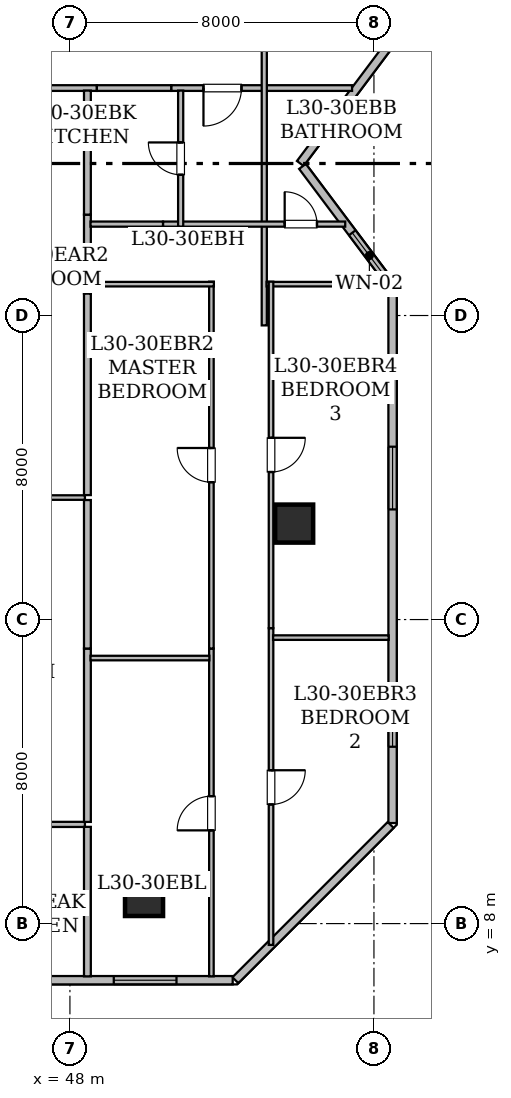
"""IFC4 building model, lengths in metres.
Left out: names, types, materials, properties, quantities, classifications, styles, units other than length and angle.
Written with IfcOpenShell. Run it as: python <this file> out.ifc"""

import sys

from ifc_helpers import new_model, si_unit, direction, frame, frame_2d, origin, origin_2d, place, context, subcontext, project, spatial, rectangle, hollow_rectangle, extrude, element, fill, save


model = new_model("IFC4")
c1 = context("Model", 3, precision=1e-05, world=origin(), true_north=direction((0.0, 1.0)))
c2 = subcontext(c1, "Body", "Model", "MODEL_VIEW")
j1 = project(units=[si_unit("LENGTHUNIT", "METRE"), si_unit("PLANEANGLEUNIT", "RADIAN")], contexts=[c1])
p1 = place(None, origin())
s1 = spatial("IfcSite", under=j1, at=p1, CompositionType="ELEMENT")
p2 = place(p1, origin())
s2 = spatial("IfcBuilding", under=s1, at=p2, CompositionType="ELEMENT")
p3 = place(p2, frame((0.0, 0.0, 120.15)))
s3 = spatial("IfcBuildingStorey", under=s2, at=p3, CompositionType="ELEMENT", Elevation=120.15)
for number, where, z_axis, x_axis in (
    (1, (49.95, 8.7, 0.0), (0.0, 0.0, 1.0), (1.0, 0.0, 0.0)),
    (2, (53.9, 18.525, 0.0), (0.0, 0.0, 1.0), (1.0, 0.0, 0.0)),
):
    element("IfcColumn", number, at=place(p3, frame(where, z_axis=z_axis, x_axis=x_axis)), inside=s3, PredefinedType="COLUMN", context=c2, shape_type="SweptSolid", body=[
        extrude(hollow_rectangle(XDim=1.0, YDim=1.0, WallThickness=0.05, at=origin_2d()), origin(), (0.0, 0.0, 1.0), 3.65),
    ])
p4 = place(p3, frame((56.456, 31.191, 0.0), z_axis=(0.0, 0.0, 1.0), x_axis=(-0.600137081448, -0.799897170561, 0.0)))
e3 = element("IfcWall", 3, at=p4, inside=s3, PredefinedType="STANDARD", context=c2, shape_type="SweptSolid", body=[
    extrude(rectangle(XDim=3.989, YDim=0.22, at=frame_2d((1.995, 0.0))), origin(), (0.0, 0.0, 1.0), 3.43),
])
p5 = place(p3, frame((54.119, 27.924, 0.0), z_axis=(0.0, 0.0, 1.0), x_axis=(0.600039540588, -0.799970343032, 0.0)))
e4 = element("IfcWall", 4, at=p5, inside=s3, PredefinedType="STANDARD", context=c2, shape_type="SweptSolid", body=[
    extrude(rectangle(XDim=3.952, YDim=0.22, at=frame_2d((1.976, 0.0))), origin(), (0.0, 0.0, 1.0), 3.43),
])
p6 = place(p5, frame((2.184, 0.0, 0.85)))
e5 = element("IfcOpeningElement", 5, at=p6, cuts=e4, PredefinedType="OPENING", context=c2, shape_type="SweptSolid", body=[
    extrude(rectangle(XDim=1.5, YDim=1.6, at=frame_2d((0.75, 0.8))), frame((0.0, 0.12, 0.0), z_axis=(0.0, -1.0, 0.0), x_axis=(1.0, 0.0, 0.0)), (0.0, 0.0, 1.0), 0.24),
])
p7 = place(p3, frame((56.49, 24.707, 0.0), z_axis=(0.0, 0.0, 1.0), x_axis=(0.0, -1.0, 0.0)))
e6 = element("IfcWall", 6, at=p7, inside=s3, PredefinedType="STANDARD", context=c2, shape_type="SweptSolid", body=[
    extrude(rectangle(XDim=14.061, YDim=0.22, at=frame_2d((7.031, 0.0))), origin(), (0.0, 0.0, 1.0), 3.43),
])
p8 = place(p7, frame((10.404, 0.0, 0.85)))
e7 = element("IfcOpeningElement", 7, at=p8, cuts=e6, PredefinedType="OPENING", context=c2, shape_type="SweptSolid", body=[
    extrude(rectangle(XDim=1.65, YDim=1.55, at=frame_2d((0.825, 0.775))), frame((0.0, 0.12, 0.0), z_axis=(0.0, -1.0, 0.0), x_axis=(1.0, 0.0, 0.0)), (0.0, 0.0, 1.0), 0.24),
])
p9 = place(p7, frame((4.159, 0.0, 0.85)))
e8 = element("IfcOpeningElement", 8, at=p9, cuts=e6, PredefinedType="OPENING", context=c2, shape_type="SweptSolid", body=[
    extrude(rectangle(XDim=1.65, YDim=1.55, at=frame_2d((0.825, 0.775))), frame((0.0, 0.12, 0.0), z_axis=(0.0, -1.0, 0.0), x_axis=(1.0, 0.0, 0.0)), (0.0, 0.0, 1.0), 0.24),
])
p10 = place(p3, frame((56.44, 10.596, 0.0), z_axis=(0.0, 0.0, 1.0), x_axis=(-0.707106781187, -0.707106781187, 0.0)))
e9 = element("IfcWall", 9, at=p10, inside=s3, PredefinedType="STANDARD", context=c2, shape_type="SweptSolid", body=[
    extrude(rectangle(XDim=5.778, YDim=0.22, at=frame_2d((2.889, 0.0))), origin(), (0.0, 0.0, 1.0), 3.43),
])
p11 = place(p3, frame((52.283, 6.51, 0.0), z_axis=(0.0, 0.0, 1.0), x_axis=(-1.0, 0.0, 0.0)))
e10 = element("IfcWall", 10, at=p11, inside=s3, PredefinedType="STANDARD", context=c2, shape_type="SweptSolid", body=[
    extrude(rectangle(XDim=38.568, YDim=0.22, at=frame_2d((19.284, 0.0))), origin(), (0.0, 0.0, 1.0), 3.43),
])
p12 = place(p11, frame((35.53, 0.0, 0.85)))
e11 = element("IfcOpeningElement", 11, at=p12, cuts=e10, PredefinedType="OPENING", context=c2, shape_type="SweptSolid", body=[
    extrude(rectangle(XDim=1.65, YDim=1.55, at=frame_2d((0.825, 0.775))), frame((0.0, 0.12, 0.0), z_axis=(0.0, -1.0, 0.0), x_axis=(1.0, 0.0, 0.0)), (0.0, 0.0, 1.0), 0.24),
])
p13 = place(p11, frame((28.578, 0.0, 0.85)))
e12 = element("IfcOpeningElement", 12, at=p13, cuts=e10, PredefinedType="OPENING", context=c2, shape_type="SweptSolid", body=[
    extrude(rectangle(XDim=1.65, YDim=1.55, at=frame_2d((0.825, 0.775))), frame((0.0, 0.12, 0.0), z_axis=(0.0, -1.0, 0.0), x_axis=(1.0, 0.0, 0.0)), (0.0, 0.0, 1.0), 0.24),
])
p14 = place(p11, frame((21.362, 0.0, 0.85)))
e13 = element("IfcOpeningElement", 13, at=p14, cuts=e10, PredefinedType="OPENING", context=c2, shape_type="SweptSolid", body=[
    extrude(rectangle(XDim=1.65, YDim=1.55, at=frame_2d((0.825, 0.775))), frame((0.0, 0.12, 0.0), z_axis=(0.0, -1.0, 0.0), x_axis=(1.0, 0.0, 0.0)), (0.0, 0.0, 1.0), 0.24),
])
p15 = place(p11, frame((14.097, 0.0, 0.85)))
e14 = element("IfcOpeningElement", 14, at=p15, cuts=e10, PredefinedType="OPENING", context=c2, shape_type="SweptSolid", body=[
    extrude(rectangle(XDim=1.65, YDim=1.55, at=frame_2d((0.825, 0.775))), frame((0.0, 0.12, 0.0), z_axis=(0.0, -1.0, 0.0), x_axis=(1.0, 0.0, 0.0)), (0.0, 0.0, 1.0), 0.24),
])
p16 = place(p11, frame((1.479, 0.0, 0.85)))
e15 = element("IfcOpeningElement", 15, at=p16, cuts=e10, PredefinedType="OPENING", context=c2, shape_type="SweptSolid", body=[
    extrude(rectangle(XDim=1.65, YDim=1.55, at=frame_2d((0.825, 0.775))), frame((0.0, 0.12, 0.0), z_axis=(0.0, -1.0, 0.0), x_axis=(1.0, 0.0, 0.0)), (0.0, 0.0, 1.0), 0.24),
])
p17 = place(p3, frame((48.709, 29.985, 0.0), z_axis=(0.0, 0.0, 1.0), x_axis=(-1.0, 0.0, 0.0)))
e16 = element("IfcWall", 16, at=p17, inside=s3, PredefinedType="STANDARD", context=c2, shape_type="SweptSolid", body=[
    extrude(rectangle(XDim=3.906, YDim=0.15, at=frame_2d((1.953, 0.0))), origin(), (0.0, 0.0, 1.0), 2.647),
])
p18 = place(p3, frame((55.424, 29.985, 0.0), z_axis=(0.0, 0.0, 1.0), x_axis=(-1.0, 0.0, 0.0)))
e17 = element("IfcWall", 17, at=p18, inside=s3, PredefinedType="STANDARD", context=c2, shape_type="SweptSolid", body=[
    extrude(rectangle(XDim=4.759, YDim=0.15, at=frame_2d((2.379, 0.0))), origin(), (0.0, 0.0, 1.0), 2.876),
])
p19 = place(p18, frame((2.91, 0.0, 0.0)))
e18 = element("IfcOpeningElement", 18, at=p19, cuts=e17, PredefinedType="OPENING", context=c2, shape_type="SweptSolid", body=[
    extrude(rectangle(XDim=1.0, YDim=2.15, at=frame_2d((0.5, 1.075))), frame((0.0, 0.085, 0.0), z_axis=(0.0, -1.0, 0.0), x_axis=(1.0, 0.0, 0.0)), (0.0, 0.0, 1.0), 0.17),
])
p20 = place(p3, frame((50.665, 29.985, 0.0), z_axis=(0.0, 0.0, 1.0), x_axis=(-1.0, 0.0, 0.0)))
e19 = element("IfcWall", 19, at=p20, inside=s3, PredefinedType="STANDARD", context=c2, shape_type="SweptSolid", body=[
    extrude(rectangle(XDim=1.956, YDim=0.15, at=frame_2d((0.978, 0.0))), origin(), (0.0, 0.0, 1.0), 3.43),
])
p21 = place(p3, frame((44.803, 19.21, 0.0), z_axis=(0.0, 0.0, 1.0), x_axis=(1.0, 0.0, 0.0)))
e20 = element("IfcWall", 20, at=p21, inside=s3, PredefinedType="PARTITIONING", context=c2, shape_type="SweptSolid", body=[
    extrude(rectangle(XDim=3.592, YDim=0.12, at=frame_2d((1.796, 0.0))), origin(), (0.0, 0.0, 1.0), 2.647),
])
p22 = place(p21, frame((0.397, 0.0, 0.0)))
e21 = element("IfcOpeningElement", 21, at=p22, cuts=e20, PredefinedType="OPENING", context=c2, shape_type="SweptSolid", body=[
    extrude(rectangle(XDim=0.9, YDim=2.1, at=frame_2d((0.45, 1.05))), frame((0.0, 0.07, 0.0), z_axis=(0.0, -1.0, 0.0), x_axis=(1.0, 0.0, 0.0)), (0.0, 0.0, 1.0), 0.14),
])
p23 = place(p3, frame((48.395, 10.61, 0.0), z_axis=(0.0, 0.0, 1.0), x_axis=(-1.0, 0.0, 0.0)))
e22 = element("IfcWall", 22, at=p23, inside=s3, PredefinedType="PARTITIONING", context=c2, shape_type="SweptSolid", body=[
    extrude(rectangle(XDim=4.166, YDim=0.135, at=frame_2d((2.083, 0.0))), origin(), (0.0, 0.0, 1.0), 3.43),
])
p24 = place(p23, frame((1.658, 0.0, 0.0)))
e23 = element("IfcOpeningElement", 23, at=p24, cuts=e22, PredefinedType="OPENING", context=c2, shape_type="SweptSolid", body=[
    extrude(rectangle(XDim=0.85, YDim=2.1, at=frame_2d((0.425, 1.05))), frame((0.0, 0.077, 0.0), z_axis=(0.0, -1.0, 0.0), x_axis=(1.0, 0.0, 0.0)), (0.0, 0.0, 1.0), 0.155),
])
p25 = place(p3, frame((48.46, 15.237, 0.0), z_axis=(0.0, 0.0, 1.0), x_axis=(0.0, -1.0, 0.0)))
e24 = element("IfcWall", 24, at=p25, inside=s3, PredefinedType="STANDARD", context=c2, shape_type="SweptSolid", body=[
    extrude(rectangle(XDim=4.562, YDim=0.18, at=frame_2d((2.281, 0.0))), origin(), (0.0, 0.0, 1.0), 2.647),
])
p26 = place(p3, frame((48.46, 19.145, 0.0), z_axis=(0.0, 0.0, 1.0), x_axis=(0.0, -1.0, 0.0)))
e25 = element("IfcWall", 25, at=p26, inside=s3, PredefinedType="STANDARD", context=c2, shape_type="SweptSolid", body=[
    extrude(rectangle(XDim=3.908, YDim=0.18, at=frame_2d((1.954, 0.0))), origin(), (0.0, 0.0, 1.0), 2.687),
])
p27 = place(p3, frame((48.46, 26.654, 0.0), z_axis=(0.0, 0.0, 1.0), x_axis=(0.0, -1.0, 0.0)))
e26 = element("IfcWall", 26, at=p27, inside=s3, PredefinedType="STANDARD", context=c2, shape_type="SweptSolid", body=[
    extrude(rectangle(XDim=2.078, YDim=0.18, at=frame_2d((1.039, 0.0))), origin(), (0.0, 0.0, 1.0), 3.43),
])
p28 = place(p3, frame((48.46, 29.918, 0.0), z_axis=(0.0, 0.0, 1.0), x_axis=(0.0, -1.0, 0.0)))
e27 = element("IfcWall", 27, at=p28, inside=s3, PredefinedType="STANDARD", context=c2, shape_type="SweptSolid", body=[
    extrude(rectangle(XDim=3.264, YDim=0.18, at=frame_2d((1.632, 0.0))), origin(), (0.0, 0.0, 1.0), 3.43),
])
p29 = place(p3, frame((48.46, 24.576, 0.0), z_axis=(0.0, 0.0, 1.0), x_axis=(0.0, -1.0, 0.0)))
e28 = element("IfcWall", 28, at=p29, inside=s3, PredefinedType="STANDARD", context=c2, shape_type="SweptSolid", body=[
    extrude(rectangle(XDim=5.301, YDim=0.18, at=frame_2d((2.65, 0.0))), origin(), (0.0, 0.0, 1.0), 2.687),
])
p30 = place(p3, frame((48.46, 10.545, 0.0), z_axis=(0.0, 0.0, 1.0), x_axis=(0.0, -1.0, 0.0)))
e29 = element("IfcWall", 29, at=p30, inside=s3, PredefinedType="STANDARD", context=c2, shape_type="SweptSolid", body=[
    extrude(rectangle(XDim=3.933, YDim=0.18, at=frame_2d((1.966, 0.0))), origin(), (0.0, 0.0, 1.0), 2.876),
])
p31 = place(p3, frame((53.114, 32.52, 0.0), z_axis=(0.0, 0.0, 1.0), x_axis=(0.0, -1.0, 0.0)))
e30 = element("IfcWall", 30, at=p31, inside=s3, PredefinedType="PARTITIONING", context=c2, shape_type="SweptSolid", body=[
    extrude(rectangle(XDim=8.78, YDim=0.135, at=frame_2d((4.39, 0.0))), origin(), (0.0, 0.0, 1.0), 3.43),
])
p32 = place(p3, frame((50.449, 26.405, 0.0), z_axis=(0.0, 0.0, 1.0), x_axis=(1.0, 0.0, 0.0)))
e31 = element("IfcWall", 31, at=p32, inside=s3, PredefinedType="PARTITIONING", context=c2, shape_type="SweptSolid", body=[
    extrude(rectangle(XDim=4.795, YDim=0.135, at=frame_2d((2.397, 0.0))), origin(), (0.0, 0.0, 1.0), 2.876),
])
p33 = place(p32, frame((3.202, 0.0, 0.0)))
e32 = element("IfcOpeningElement", 32, at=p33, cuts=e31, PredefinedType="OPENING", context=c2, shape_type="SweptSolid", body=[
    extrude(rectangle(XDim=0.85, YDim=2.1, at=frame_2d((0.425, 1.05))), frame((0.0, 0.077, 0.0), z_axis=(0.0, -1.0, 0.0), x_axis=(1.0, 0.0, 0.0)), (0.0, 0.0, 1.0), 0.155),
])
p34 = place(p3, frame((48.542, 26.405, 0.0), z_axis=(0.0, 0.0, 1.0), x_axis=(1.0, 0.0, 0.0)))
e33 = element("IfcWall", 33, at=p34, inside=s3, PredefinedType="PARTITIONING", context=c2, shape_type="SweptSolid", body=[
    extrude(rectangle(XDim=1.907, YDim=0.135, at=frame_2d((0.954, 0.0))), origin(), (0.0, 0.0, 1.0), 3.43),
])
p35 = place(p3, frame((50.914, 26.34, 0.0), z_axis=(0.0, 0.0, 1.0), x_axis=(0.0, 1.0, 0.0)))
e34 = element("IfcWall", 34, at=p35, inside=s3, PredefinedType="PARTITIONING", context=c2, shape_type="SweptSolid", body=[
    extrude(rectangle(XDim=3.578, YDim=0.135, at=frame_2d((1.789, 0.0))), origin(), (0.0, 0.0, 1.0), 3.43),
])
p36 = place(p35, frame((1.364, 0.0, 0.0)))
e35 = element("IfcOpeningElement", 35, at=p36, cuts=e34, PredefinedType="OPENING", context=c2, shape_type="SweptSolid", body=[
    extrude(rectangle(XDim=0.85, YDim=2.1, at=frame_2d((0.425, 1.05))), frame((0.0, 0.077, 0.0), z_axis=(0.0, -1.0, 0.0), x_axis=(1.0, 0.0, 0.0)), (0.0, 0.0, 1.0), 0.155),
])
p37 = place(p3, frame((51.723, 6.612, 0.0), z_axis=(0.0, 0.0, 1.0), x_axis=(0.0, 1.0, 0.0)))
e36 = element("IfcWall", 36, at=p37, inside=s3, PredefinedType="PARTITIONING", context=c2, shape_type="SweptSolid", body=[
    extrude(rectangle(XDim=8.625, YDim=0.12, at=frame_2d((4.312, 0.0))), origin(), (0.0, 0.0, 1.0), 2.876),
])
p38 = place(p37, frame((3.841, 0.0, 0.0)))
e37 = element("IfcOpeningElement", 37, at=p38, cuts=e36, PredefinedType="OPENING", context=c2, shape_type="SweptSolid", body=[
    extrude(rectangle(XDim=0.9, YDim=2.1, at=frame_2d((0.45, 1.05))), frame((0.0, 0.07, 0.0), z_axis=(0.0, -1.0, 0.0), x_axis=(1.0, 0.0, 0.0)), (0.0, 0.0, 1.0), 0.14),
])
p39 = place(p3, frame((51.723, 15.237, 0.0), z_axis=(0.0, 0.0, 1.0), x_axis=(0.0, 1.0, 0.0)))
e38 = element("IfcWall", 38, at=p39, inside=s3, PredefinedType="PARTITIONING", context=c2, shape_type="SweptSolid", body=[
    extrude(rectangle(XDim=9.653, YDim=0.12, at=frame_2d((4.826, 0.0))), origin(), (0.0, 0.0, 1.0), 2.687),
])
p40 = place(p39, frame((4.377, 0.0, 0.0)))
e39 = element("IfcOpeningElement", 39, at=p40, cuts=e38, PredefinedType="OPENING", context=c2, shape_type="SweptSolid", body=[
    extrude(rectangle(XDim=0.9, YDim=2.1, at=frame_2d((0.45, 1.05))), frame((0.0, 0.07, 0.0), z_axis=(0.0, -1.0, 0.0), x_axis=(1.0, 0.0, 0.0)), (0.0, 0.0, 1.0), 0.14),
])
p41 = place(p3, frame((51.788, 24.825, 0.0), z_axis=(0.0, 0.0, 1.0), x_axis=(-1.0, 0.0, 0.0)))
e40 = element("IfcWall", 40, at=p41, inside=s3, PredefinedType="PARTITIONING", context=c2, shape_type="SweptSolid", body=[
    extrude(rectangle(XDim=3.246, YDim=0.12, at=frame_2d((1.623, 0.0))), origin(), (0.0, 0.0, 1.0), 3.43),
])
p42 = place(p3, frame((53.292, 15.774, 0.0), z_axis=(0.0, 0.0, 1.0), x_axis=(0.0, -1.0, 0.0)))
e41 = element("IfcWall", 41, at=p42, inside=s3, PredefinedType="PARTITIONING", context=c2, shape_type="SweptSolid", body=[
    extrude(rectangle(XDim=8.335, YDim=0.12, at=frame_2d((4.167, 0.0))), origin(), (0.0, 0.0, 1.0), 3.43),
])
p43 = place(p42, frame((3.739, 0.0, 0.0)))
e42 = element("IfcOpeningElement", 42, at=p43, cuts=e41, PredefinedType="OPENING", context=c2, shape_type="SweptSolid", body=[
    extrude(rectangle(XDim=0.9, YDim=2.1, at=frame_2d((0.45, 1.05))), frame((0.0, 0.07, 0.0), z_axis=(0.0, -1.0, 0.0), x_axis=(1.0, 0.0, 0.0)), (0.0, 0.0, 1.0), 0.14),
])
p44 = place(p3, frame((56.332, 24.825, 0.0), z_axis=(0.0, 0.0, 1.0), x_axis=(-1.0, 0.0, 0.0)))
e43 = element("IfcWall", 43, at=p44, inside=s3, PredefinedType="PARTITIONING", context=c2, shape_type="SweptSolid", body=[
    extrude(rectangle(XDim=3.157, YDim=0.12, at=frame_2d((1.579, 0.0))), origin(), (0.0, 0.0, 1.0), 2.876),
])
p45 = place(p3, frame((53.292, 24.89, 0.0), z_axis=(0.0, 0.0, 1.0), x_axis=(0.0, -1.0, 0.0)))
e44 = element("IfcWall", 44, at=p45, inside=s3, PredefinedType="PARTITIONING", context=c2, shape_type="SweptSolid", body=[
    extrude(rectangle(XDim=9.116, YDim=0.12, at=frame_2d((4.558, 0.0))), origin(), (0.0, 0.0, 1.0), 2.687),
])
p46 = place(p45, frame((4.108, 0.0, 0.0)))
e45 = element("IfcOpeningElement", 45, at=p46, cuts=e44, PredefinedType="OPENING", context=c2, shape_type="SweptSolid", body=[
    extrude(rectangle(XDim=0.9, YDim=2.1, at=frame_2d((0.45, 1.05))), frame((0.0, 0.07, 0.0), z_axis=(0.0, -1.0, 0.0), x_axis=(1.0, 0.0, 0.0)), (0.0, 0.0, 1.0), 0.14),
])
p47 = place(p3, frame((48.542, 14.987, 0.0), z_axis=(0.0, 0.0, 1.0), x_axis=(1.0, 0.0, 0.0)))
e46 = element("IfcWall", 46, at=p47, inside=s3, PredefinedType="PARTITIONING", context=c2, shape_type="SweptSolid", body=[
    extrude(rectangle(XDim=3.127, YDim=0.12, at=frame_2d((1.563, 0.0))), origin(), (0.0, 0.0, 1.0), 3.43),
])
p48 = place(p3, frame((53.346, 15.525, 0.0), z_axis=(0.0, 0.0, 1.0), x_axis=(1.0, 0.0, 0.0)))
e47 = element("IfcWall", 47, at=p48, inside=s3, PredefinedType="PARTITIONING", context=c2, shape_type="SweptSolid", body=[
    extrude(rectangle(XDim=3.042, YDim=0.12, at=frame_2d((1.521, 0.0))), origin(), (0.0, 0.0, 1.0), 3.43),
])
p49 = place(p6, origin())
e48 = element("IfcWindow", 48, at=p49, inside=s3, PartitioningType="SINGLE_PANEL", PredefinedType="WINDOW", context=c2, shape_type="SweptSolid", body=[
    extrude(rectangle(XDim=1.5, YDim=1.6, at=frame_2d((0.75, 0.8))), frame((0.0, 0.03, 0.0), z_axis=(0.0, -1.0, 0.0), x_axis=(1.0, 0.0, 0.0)), (0.0, 0.0, 1.0), 0.06),
])
fill(e5, e48)
p50 = place(p16, origin())
e49 = element("IfcWindow", 49, at=p50, inside=s3, PartitioningType="SINGLE_PANEL", PredefinedType="WINDOW", context=c2, shape_type="SweptSolid", body=[
    extrude(rectangle(XDim=1.65, YDim=1.55, at=frame_2d((0.825, 0.775))), frame((0.0, 0.03, 0.0), z_axis=(0.0, -1.0, 0.0), x_axis=(1.0, 0.0, 0.0)), (0.0, 0.0, 1.0), 0.06),
])
fill(e15, e49)
p51 = place(p8, origin())
e50 = element("IfcWindow", 50, at=p51, inside=s3, PartitioningType="SINGLE_PANEL", PredefinedType="WINDOW", context=c2, shape_type="SweptSolid", body=[
    extrude(rectangle(XDim=1.65, YDim=1.55, at=frame_2d((0.825, 0.775))), frame((0.0, 0.03, 0.0), z_axis=(0.0, -1.0, 0.0), x_axis=(1.0, 0.0, 0.0)), (0.0, 0.0, 1.0), 0.06),
])
fill(e7, e50)
p52 = place(p9, origin())
e51 = element("IfcWindow", 51, at=p52, inside=s3, PartitioningType="SINGLE_PANEL", PredefinedType="WINDOW", context=c2, shape_type="SweptSolid", body=[
    extrude(rectangle(XDim=1.65, YDim=1.55, at=frame_2d((0.825, 0.775))), frame((0.0, 0.03, 0.0), z_axis=(0.0, -1.0, 0.0), x_axis=(1.0, 0.0, 0.0)), (0.0, 0.0, 1.0), 0.06),
])
fill(e8, e51)
p53 = place(p19, origin())
e52 = element("IfcDoor", 52, at=p53, inside=s3, OperationType="SINGLE_SWING_RIGHT", PredefinedType="DOOR", context=c2, shape_type="SweptSolid", body=[
    extrude(rectangle(XDim=1.0, YDim=2.15, at=frame_2d((0.5, 1.075))), frame((0.0, 0.025, 0.0), z_axis=(0.0, -1.0, 0.0), x_axis=(1.0, 0.0, 0.0)), (0.0, 0.0, 1.0), 0.05),
])
fill(e18, e52)
p54 = place(p33, origin())
e53 = element("IfcDoor", 53, at=p54, inside=s3, OperationType="SINGLE_SWING_LEFT", PredefinedType="DOOR", context=c2, shape_type="SweptSolid", body=[
    extrude(rectangle(XDim=0.85, YDim=2.1, at=frame_2d((0.425, 1.05))), frame((0.0, 0.025, 0.0), z_axis=(0.0, -1.0, 0.0), x_axis=(1.0, 0.0, 0.0)), (0.0, 0.0, 1.0), 0.05),
])
fill(e32, e53)
p55 = place(p36, origin())
e54 = element("IfcDoor", 54, at=p55, inside=s3, OperationType="SINGLE_SWING_RIGHT", PredefinedType="DOOR", context=c2, shape_type="SweptSolid", body=[
    extrude(rectangle(XDim=0.85, YDim=2.1, at=frame_2d((0.425, 1.05))), frame((0.0, 0.025, 0.0), z_axis=(0.0, -1.0, 0.0), x_axis=(1.0, 0.0, 0.0)), (0.0, 0.0, 1.0), 0.05),
])
fill(e35, e54)
p56 = place(p38, origin())
e55 = element("IfcDoor", 55, at=p56, inside=s3, OperationType="SINGLE_SWING_LEFT", PredefinedType="DOOR", context=c2, shape_type="SweptSolid", body=[
    extrude(rectangle(XDim=0.9, YDim=2.1, at=frame_2d((0.45, 1.05))), frame((0.0, 0.025, 0.0), z_axis=(0.0, -1.0, 0.0), x_axis=(1.0, 0.0, 0.0)), (0.0, 0.0, 1.0), 0.05),
])
fill(e37, e55)
p57 = place(p40, origin())
e56 = element("IfcDoor", 56, at=p57, inside=s3, OperationType="SINGLE_SWING_RIGHT", PredefinedType="DOOR", context=c2, shape_type="SweptSolid", body=[
    extrude(rectangle(XDim=0.9, YDim=2.1, at=frame_2d((0.45, 1.05))), frame((0.0, 0.025, 0.0), z_axis=(0.0, -1.0, 0.0), x_axis=(1.0, 0.0, 0.0)), (0.0, 0.0, 1.0), 0.05),
])
fill(e39, e56)
p58 = place(p43, origin())
e57 = element("IfcDoor", 57, at=p58, inside=s3, OperationType="SINGLE_SWING_LEFT", PredefinedType="DOOR", context=c2, shape_type="SweptSolid", body=[
    extrude(rectangle(XDim=0.9, YDim=2.1, at=frame_2d((0.45, 1.05))), frame((0.0, 0.025, 0.0), z_axis=(0.0, -1.0, 0.0), x_axis=(1.0, 0.0, 0.0)), (0.0, 0.0, 1.0), 0.05),
])
fill(e42, e57)
p59 = place(p46, origin())
e58 = element("IfcDoor", 58, at=p59, inside=s3, OperationType="SINGLE_SWING_LEFT", PredefinedType="DOOR", context=c2, shape_type="SweptSolid", body=[
    extrude(rectangle(XDim=0.9, YDim=2.1, at=frame_2d((0.45, 1.05))), frame((0.0, 0.025, 0.0), z_axis=(0.0, -1.0, 0.0), x_axis=(1.0, 0.0, 0.0)), (0.0, 0.0, 1.0), 0.05),
])
fill(e45, e58)
save(model, sys.argv[1])
